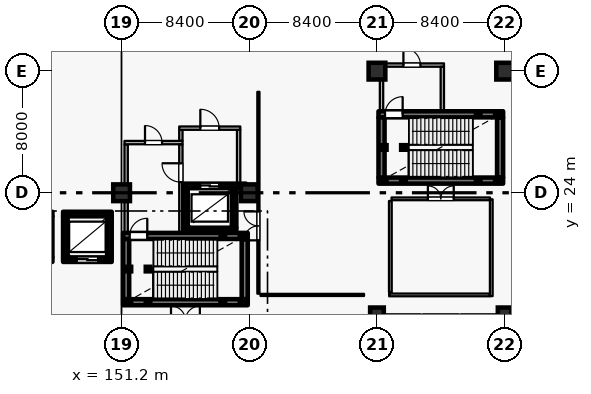
"""IFC4 building model, lengths in metres.
Left out: names, types, materials, properties, quantities, classifications, styles, units other than length and angle.
Written with IfcOpenShell. Run it as: python <this file> out.ifc"""

import sys

from ifc_helpers import new_model, si_unit, direction, frame, frame_2d, origin, origin_2d, place, context, subcontext, project, spatial, rectangle, hollow_rectangle, circle, extrude, element, fill, save


model = new_model("IFC4")
c1 = context("Model", 3, precision=1e-05, world=origin(), true_north=direction((0.0, 1.0)))
c2 = subcontext(c1, "Body", "Model", "MODEL_VIEW")
j1 = project(units=[si_unit("LENGTHUNIT", "METRE"), si_unit("PLANEANGLEUNIT", "RADIAN")], contexts=[c1])
p1 = place(None, origin())
s1 = spatial("IfcSite", under=j1, at=p1, CompositionType="ELEMENT")
p2 = place(p1, origin())
s2 = spatial("IfcBuilding", under=s1, at=p2, CompositionType="ELEMENT")
p3 = place(p2, origin())
s3 = spatial("IfcBuildingStorey", under=s2, at=p3, CompositionType="ELEMENT", Elevation=0.0)
for number, where, z_axis, x_axis in (
    (1, (151.2, 24.0, 0.0), (0.0, 0.0, 1.0), (1.0, 0.0, 0.0)),
    (2, (159.6, 24.0, 0.0), (0.0, 0.0, 1.0), (1.0, 0.0, 0.0)),
):
    element("IfcColumn", number, at=place(p3, frame(where, z_axis=z_axis, x_axis=x_axis)), inside=s3, PredefinedType="COLUMN", context=c2, shape_type="SweptSolid", body=[
        extrude(circle(Radius=0.55, at=origin_2d()), origin(), (0.0, 0.0, 1.0), 6.0),
    ])
p4 = place(p3, frame((168.0, 16.0, 0.0), z_axis=(0.0, 0.0, 1.0), x_axis=(1.0, 0.0, 0.0)))
e3 = element("IfcColumn", 3, at=p4, inside=s3, PredefinedType="COLUMN", context=c2, shape_type="SweptSolid", body=[
    extrude(circle(Radius=0.45, at=origin_2d()), origin(), (0.0, 0.0, 1.0), 6.0),
])
p5 = place(p3, frame((168.0, 32.0, 0.0), z_axis=(0.0, 0.0, 1.0), x_axis=(1.0, 0.0, 0.0)))
e4 = element("IfcColumn", 4, at=p5, inside=s3, PredefinedType="COLUMN", context=c2, shape_type="SweptSolid", body=[
    extrude(circle(Radius=0.55, at=origin_2d()), origin(), (0.0, 0.0, 1.0), 6.0),
])
p6 = place(p3, frame((176.4, 16.0, 0.0), z_axis=(0.0, 0.0, 1.0), x_axis=(1.0, 0.0, 0.0)))
e5 = element("IfcColumn", 5, at=p6, inside=s3, PredefinedType="COLUMN", context=c2, shape_type="SweptSolid", body=[
    extrude(circle(Radius=0.45, at=origin_2d()), origin(), (0.0, 0.0, 1.0), 6.0),
])
p7 = place(p3, frame((176.4, 32.0, 0.0), z_axis=(0.0, 0.0, 1.0), x_axis=(1.0, 0.0, 0.0)))
e6 = element("IfcColumn", 6, at=p7, inside=s3, PredefinedType="COLUMN", context=c2, shape_type="SweptSolid", body=[
    extrude(circle(Radius=0.55, at=origin_2d()), origin(), (0.0, 0.0, 1.0), 6.0),
])
p8 = place(p3, frame((155.25, 21.55, 0.0), z_axis=(0.0, 0.0, 1.0), x_axis=(1.0, 0.0, 0.0)))
e7 = element("IfcWall", 7, at=p8, inside=s3, PredefinedType="SHEAR", context=c2, shape_type="SweptSolid", body=[
    extrude(rectangle(XDim=3.5, YDim=0.3, at=frame_2d((1.75, 0.0))), origin(), (0.0, 0.0, 1.0), 5.675),
])
p9 = place(p3, frame((158.6, 21.705, 0.0), z_axis=(0.0, 0.0, 1.0), x_axis=(0.0, 1.0, 0.0)))
e8 = element("IfcWall", 8, at=p9, inside=s3, PredefinedType="SHEAR", context=c2, shape_type="SweptSolid", body=[
    extrude(rectangle(XDim=2.59, YDim=0.3, at=frame_2d((1.295, 0.0))), origin(), (0.0, 0.0, 1.0), 5.675),
])
p10 = place(p3, frame((159.38, 24.45, 0.0), z_axis=(0.0, 0.0, 1.0), x_axis=(-1.0, 0.0, 0.0)))
e9 = element("IfcWall", 9, at=p10, inside=s3, PredefinedType="SHEAR", context=c2, shape_type="SweptSolid", body=[
    extrude(rectangle(XDim=4.13, YDim=0.3, at=frame_2d((2.065, 0.0))), origin(), (0.0, 0.0, 1.0), 5.675),
])
p11 = place(p10, frame((1.755, 0.0, 0.0)))
e10 = element("IfcOpeningElement", 10, at=p11, cuts=e9, PredefinedType="OPENING", context=c2, shape_type="SweptSolid", body=[
    extrude(rectangle(XDim=1.25, YDim=2.25, at=frame_2d((0.625, 1.125))), frame((0.0, 0.16, 0.0), z_axis=(0.0, -1.0, 0.0), x_axis=(1.0, 0.0, 0.0)), (0.0, 0.0, 1.0), 0.32),
])
p12 = place(p3, frame((155.4, 24.295, 0.0), z_axis=(0.0, 0.0, 1.0), x_axis=(0.0, -1.0, 0.0)))
e11 = element("IfcWall", 11, at=p12, inside=s3, PredefinedType="SHEAR", context=c2, shape_type="SweptSolid", body=[
    extrude(rectangle(XDim=2.59, YDim=0.3, at=frame_2d((1.295, 0.0))), origin(), (0.0, 0.0, 1.0), 5.675),
])
p13 = place(p3, frame((147.35, 19.6, 0.0), z_axis=(0.0, 0.0, 1.0), x_axis=(1.0, 0.0, 0.0)))
e12 = element("IfcWall", 12, at=p13, inside=s3, PredefinedType="SHEAR", context=c2, shape_type="SweptSolid", body=[
    extrude(rectangle(XDim=3.2, YDim=0.3, at=frame_2d((1.6, 0.0))), origin(), (0.0, 0.0, 1.0), 5.675),
])
p14 = place(p13, frame((0.9, 0.0, 0.0)))
e13 = element("IfcOpeningElement", 13, at=p14, cuts=e12, PredefinedType="OPENING", context=c2, shape_type="SweptSolid", body=[
    extrude(rectangle(XDim=1.4, YDim=2.35, at=frame_2d((0.7, 1.175))), frame((0.0, 0.16, 0.0), z_axis=(0.0, -1.0, 0.0), x_axis=(1.0, 0.0, 0.0)), (0.0, 0.0, 1.0), 0.32),
])
p15 = place(p3, frame((150.4, 19.755, 0.0), z_axis=(0.0, 0.0, 1.0), x_axis=(0.0, 1.0, 0.0)))
e14 = element("IfcWall", 14, at=p15, inside=s3, PredefinedType="SHEAR", context=c2, shape_type="SweptSolid", body=[
    extrude(rectangle(XDim=2.69, YDim=0.3, at=frame_2d((1.345, 0.0))), origin(), (0.0, 0.0, 1.0), 5.675),
])
p16 = place(p3, frame((150.55, 22.6, 0.0), z_axis=(0.0, 0.0, 1.0), x_axis=(-1.0, 0.0, 0.0)))
e15 = element("IfcWall", 15, at=p16, inside=s3, PredefinedType="SHEAR", context=c2, shape_type="SweptSolid", body=[
    extrude(rectangle(XDim=3.2, YDim=0.3, at=frame_2d((1.6, 0.0))), origin(), (0.0, 0.0, 1.0), 5.675),
])
p17 = place(p3, frame((147.5, 22.445, 0.0), z_axis=(0.0, 0.0, 1.0), x_axis=(0.0, -1.0, 0.0)))
e16 = element("IfcWall", 16, at=p17, inside=s3, PredefinedType="SHEAR", context=c2, shape_type="SweptSolid", body=[
    extrude(rectangle(XDim=2.69, YDim=0.3, at=frame_2d((1.345, 0.0))), origin(), (0.0, 0.0, 1.0), 5.675),
])
p18 = place(p3, frame((151.3, 16.8, 0.0), z_axis=(0.0, 0.0, 1.0), x_axis=(1.0, 0.0, 0.0)))
e17 = element("IfcWall", 17, at=p18, inside=s3, PredefinedType="SHEAR", context=c2, shape_type="SweptSolid", body=[
    extrude(rectangle(XDim=8.2, YDim=0.4, at=frame_2d((4.1, 0.0))), origin(), (0.0, 0.0, 1.0), 5.675),
])
p19 = place(p3, frame((159.3, 17.005, 0.0), z_axis=(0.0, 0.0, 1.0), x_axis=(0.0, 1.0, 0.0)))
e18 = element("IfcWall", 18, at=p19, inside=s3, PredefinedType="SHEAR", context=c2, shape_type="SweptSolid", body=[
    extrude(rectangle(XDim=3.95, YDim=0.4, at=frame_2d((1.975, 0.0))), origin(), (0.0, 0.0, 1.0), 5.675),
])
p20 = place(p3, frame((151.3, 21.16, 0.0), z_axis=(0.0, 0.0, 1.0), x_axis=(1.0, 0.0, 0.0)))
e19 = element("IfcWall", 19, at=p20, inside=s3, PredefinedType="SHEAR", context=c2, shape_type="SweptSolid", body=[
    extrude(rectangle(XDim=8.2, YDim=0.4, at=frame_2d((4.1, 0.0))), origin(), (0.0, 0.0, 1.0), 5.675),
])
p21 = place(p20, frame((0.43, 0.0, 0.0)))
e20 = element("IfcOpeningElement", 20, at=p21, cuts=e19, PredefinedType="OPENING", context=c2, shape_type="SweptSolid", body=[
    extrude(rectangle(XDim=1.16, YDim=2.2, at=frame_2d((0.58, 1.1))), frame((0.0, 0.21, 0.0), z_axis=(0.0, -1.0, 0.0), x_axis=(1.0, 0.0, 0.0)), (0.0, 0.0, 1.0), 0.42),
])
p22 = place(p3, frame((151.5, 17.005, 0.0), z_axis=(0.0, 0.0, 1.0), x_axis=(0.0, 1.0, 0.0)))
e21 = element("IfcWall", 21, at=p22, inside=s3, PredefinedType="SHEAR", context=c2, shape_type="SweptSolid", body=[
    extrude(rectangle(XDim=3.95, YDim=0.4, at=frame_2d((1.975, 0.0))), origin(), (0.0, 0.0, 1.0), 5.675),
])
p23 = place(p3, frame((151.5, 21.365, 0.0), z_axis=(0.0, 0.0, 1.0), x_axis=(0.0, 1.0, 0.0)))
e22 = element("IfcWall", 22, at=p23, inside=s3, PredefinedType="PARTITIONING", context=c2, shape_type="SweptSolid", body=[
    extrude(rectangle(XDim=5.82, YDim=0.22, at=frame_2d((2.91, 0.0))), origin(), (0.0, 0.0, 1.0), 4.75),
])
p24 = place(p3, frame((151.39, 27.3, 0.0), z_axis=(0.0, 0.0, 1.0), x_axis=(1.0, 0.0, 0.0)))
e23 = element("IfcWall", 23, at=p24, inside=s3, PredefinedType="PARTITIONING", context=c2, shape_type="SweptSolid", body=[
    extrude(rectangle(XDim=3.82, YDim=0.22, at=frame_2d((1.91, 0.0))), origin(), (0.0, 0.0, 1.0), 5.675),
])
p25 = place(p24, frame((1.35, 0.0, 0.0)))
e24 = element("IfcOpeningElement", 24, at=p25, cuts=e23, PredefinedType="OPENING", context=c2, shape_type="SweptSolid", body=[
    extrude(rectangle(XDim=1.12, YDim=2.2, at=frame_2d((0.56, 1.1))), frame((0.0, 0.12, 0.0), z_axis=(0.0, -1.0, 0.0), x_axis=(1.0, 0.0, 0.0)), (0.0, 0.0, 1.0), 0.24),
])
p26 = place(p3, frame((155.1, 21.365, 0.0), z_axis=(0.0, 0.0, 1.0), x_axis=(0.0, 1.0, 0.0)))
e25 = element("IfcWall", 25, at=p26, inside=s3, PredefinedType="PARTITIONING", context=c2, shape_type="SweptSolid", body=[
    extrude(rectangle(XDim=5.82, YDim=0.22, at=frame_2d((2.91, 0.0))), origin(), (0.0, 0.0, 1.0), 5.675),
])
p27 = place(p26, frame((3.335, 0.0, 0.0)))
e26 = element("IfcOpeningElement", 26, at=p27, cuts=e25, PredefinedType="OPENING", context=c2, shape_type="SweptSolid", body=[
    extrude(rectangle(XDim=1.24, YDim=2.2, at=frame_2d((0.62, 1.1))), frame((0.0, 0.12, 0.0), z_axis=(0.0, -1.0, 0.0), x_axis=(1.0, 0.0, 0.0)), (0.0, 0.0, 1.0), 0.24),
])
p28 = place(p3, frame((155.1, 27.415, 0.0), z_axis=(0.0, 0.0, 1.0), x_axis=(0.0, 1.0, 0.0)))
e27 = element("IfcWall", 27, at=p28, inside=s3, PredefinedType="PARTITIONING", context=c2, shape_type="SweptSolid", body=[
    extrude(rectangle(XDim=0.72, YDim=0.22, at=frame_2d((0.36, 0.0))), origin(), (0.0, 0.0, 1.0), 5.675),
])
p29 = place(p3, frame((158.9, 24.605, 0.0), z_axis=(0.0, 0.0, 1.0), x_axis=(0.0, 1.0, 0.0)))
e28 = element("IfcWall", 28, at=p29, inside=s3, PredefinedType="PARTITIONING", context=c2, shape_type="SweptSolid", body=[
    extrude(rectangle(XDim=3.53, YDim=0.22, at=frame_2d((1.765, 0.0))), origin(), (0.0, 0.0, 1.0), 5.675),
])
p30 = place(p3, frame((154.99, 28.25, 0.0), z_axis=(0.0, 0.0, 1.0), x_axis=(1.0, 0.0, 0.0)))
e29 = element("IfcWall", 29, at=p30, inside=s3, PredefinedType="PARTITIONING", context=c2, shape_type="SweptSolid", body=[
    extrude(rectangle(XDim=4.02, YDim=0.22, at=frame_2d((2.01, 0.0))), origin(), (0.0, 0.0, 1.0), 5.675),
])
p31 = place(p30, frame((1.39, 0.0, 0.0)))
e30 = element("IfcOpeningElement", 30, at=p31, cuts=e29, PredefinedType="OPENING", context=c2, shape_type="SweptSolid", body=[
    extrude(rectangle(XDim=1.24, YDim=2.2, at=frame_2d((0.62, 1.1))), frame((0.0, 0.12, 0.0), z_axis=(0.0, -1.0, 0.0), x_axis=(1.0, 0.0, 0.0)), (0.0, 0.0, 1.0), 0.24),
])
for number, where, z_axis, x_axis in (
    (31, (151.68, 16.8, 0.0), (0.0, 0.0, 1.0), (1.0, 0.0, 0.0)),
    (32, (151.68, 18.98, 0.0), (0.0, 0.0, 1.0), (1.0, 0.0, 0.0)),
    (33, (152.94, 16.8, 0.0), (0.0, 0.0, 1.0), (1.0, 0.0, 0.0)),
    (34, (152.94, 18.98, 0.0), (0.0, 0.0, 1.0), (1.0, 0.0, 0.0)),
):
    element("IfcColumn", number, at=place(p3, frame(where, z_axis=z_axis, x_axis=x_axis)), inside=s3, PredefinedType="COLUMN", context=c2, shape_type="SweptSolid", body=[
        extrude(hollow_rectangle(XDim=0.3, YDim=0.3, WallThickness=0.012, at=origin_2d()), origin(), (0.0, 0.0, 1.0), 5.82),
    ])
for number, where, z_axis, x_axis in (
    (35, (157.86, 16.8, -2.7), (0.0, 0.0, 1.0), (1.0, 0.0, 0.0)),
    (36, (157.86, 21.16, -2.7), (0.0, 0.0, 1.0), (1.0, 0.0, 0.0)),
    (37, (159.12, 16.8, -2.7), (0.0, 0.0, 1.0), (1.0, 0.0, 0.0)),
    (38, (159.12, 21.16, -2.7), (0.0, 0.0, 1.0), (1.0, 0.0, 0.0)),
):
    element("IfcColumn", number, at=place(p3, frame(where, z_axis=z_axis, x_axis=x_axis)), inside=s3, PredefinedType="COLUMN", context=c2, shape_type="SweptSolid", body=[
        extrude(hollow_rectangle(XDim=0.3, YDim=0.3, WallThickness=0.012, at=origin_2d()), origin(), (0.0, 0.0, 1.0), 5.52),
    ])
p32 = place(p3, frame((168.1, 24.8, 0.0), z_axis=(0.0, 0.0, 1.0), x_axis=(1.0, 0.0, 0.0)))
e39 = element("IfcWall", 39, at=p32, inside=s3, PredefinedType="SHEAR", context=c2, shape_type="SweptSolid", body=[
    extrude(rectangle(XDim=8.2, YDim=0.4, at=frame_2d((4.1, 0.0))), origin(), (0.0, 0.0, 1.0), 5.675),
])
p33 = place(p3, frame((176.1, 25.005, 0.0), z_axis=(0.0, 0.0, 1.0), x_axis=(0.0, 1.0, 0.0)))
e40 = element("IfcWall", 40, at=p33, inside=s3, PredefinedType="SHEAR", context=c2, shape_type="SweptSolid", body=[
    extrude(rectangle(XDim=3.95, YDim=0.4, at=frame_2d((1.975, 0.0))), origin(), (0.0, 0.0, 1.0), 5.675),
])
p34 = place(p3, frame((168.1, 29.16, 0.0), z_axis=(0.0, 0.0, 1.0), x_axis=(1.0, 0.0, 0.0)))
e41 = element("IfcWall", 41, at=p34, inside=s3, PredefinedType="SHEAR", context=c2, shape_type="SweptSolid", body=[
    extrude(rectangle(XDim=8.2, YDim=0.4, at=frame_2d((4.1, 0.0))), origin(), (0.0, 0.0, 1.0), 5.675),
])
p35 = place(p34, frame((0.43, 0.0, 0.0)))
e42 = element("IfcOpeningElement", 42, at=p35, cuts=e41, PredefinedType="OPENING", context=c2, shape_type="SweptSolid", body=[
    extrude(rectangle(XDim=1.16, YDim=2.2, at=frame_2d((0.58, 1.1))), frame((0.0, 0.21, 0.0), z_axis=(0.0, -1.0, 0.0), x_axis=(1.0, 0.0, 0.0)), (0.0, 0.0, 1.0), 0.42),
])
p36 = place(p3, frame((168.3, 25.005, 0.0), z_axis=(0.0, 0.0, 1.0), x_axis=(0.0, 1.0, 0.0)))
e43 = element("IfcWall", 43, at=p36, inside=s3, PredefinedType="SHEAR", context=c2, shape_type="SweptSolid", body=[
    extrude(rectangle(XDim=3.95, YDim=0.4, at=frame_2d((1.975, 0.0))), origin(), (0.0, 0.0, 1.0), 5.675),
])
p37 = place(p3, frame((168.3, 29.365, 0.0), z_axis=(0.0, 0.0, 1.0), x_axis=(0.0, 1.0, 0.0)))
e44 = element("IfcWall", 44, at=p37, inside=s3, PredefinedType="PARTITIONING", context=c2, shape_type="SweptSolid", body=[
    extrude(rectangle(XDim=2.92, YDim=0.22, at=frame_2d((1.46, 0.0))), origin(), (0.0, 0.0, 1.0), 4.75),
])
p38 = place(p3, frame((168.19, 32.4, 0.0), z_axis=(0.0, 0.0, 1.0), x_axis=(1.0, 0.0, 0.0)))
e45 = element("IfcWall", 45, at=p38, inside=s3, PredefinedType="PARTITIONING", context=c2, shape_type="SweptSolid", body=[
    extrude(rectangle(XDim=4.22, YDim=0.22, at=frame_2d((2.11, 0.0))), origin(), (0.0, 0.0, 1.0), 5.675),
])
p39 = place(p38, frame((1.55, 0.0, 0.0)))
e46 = element("IfcOpeningElement", 46, at=p39, cuts=e45, PredefinedType="OPENING", context=c2, shape_type="SweptSolid", body=[
    extrude(rectangle(XDim=1.12, YDim=2.2, at=frame_2d((0.56, 1.1))), frame((0.0, 0.12, 0.0), z_axis=(0.0, -1.0, 0.0), x_axis=(1.0, 0.0, 0.0)), (0.0, 0.0, 1.0), 0.24),
])
p40 = place(p3, frame((172.3, 29.365, 0.0), z_axis=(0.0, 0.0, 1.0), x_axis=(0.0, 1.0, 0.0)))
e47 = element("IfcWall", 47, at=p40, inside=s3, PredefinedType="PARTITIONING", context=c2, shape_type="SweptSolid", body=[
    extrude(rectangle(XDim=2.92, YDim=0.22, at=frame_2d((1.46, 0.0))), origin(), (0.0, 0.0, 1.0), 5.675),
])
for number, where, z_axis, x_axis in (
    (48, (168.48, 24.8, 0.0), (0.0, 0.0, 1.0), (1.0, 0.0, 0.0)),
    (49, (168.48, 26.98, 0.0), (0.0, 0.0, 1.0), (1.0, 0.0, 0.0)),
    (50, (169.74, 24.8, 0.0), (0.0, 0.0, 1.0), (1.0, 0.0, 0.0)),
    (51, (169.74, 26.98, 0.0), (0.0, 0.0, 1.0), (1.0, 0.0, 0.0)),
):
    element("IfcColumn", number, at=place(p3, frame(where, z_axis=z_axis, x_axis=x_axis)), inside=s3, PredefinedType="COLUMN", context=c2, shape_type="SweptSolid", body=[
        extrude(hollow_rectangle(XDim=0.3, YDim=0.3, WallThickness=0.012, at=origin_2d()), origin(), (0.0, 0.0, 1.0), 5.82),
    ])
for number, where, z_axis, x_axis in (
    (52, (174.66, 24.8, -2.7), (0.0, 0.0, 1.0), (1.0, 0.0, 0.0)),
    (53, (174.66, 29.16, -2.7), (0.0, 0.0, 1.0), (1.0, 0.0, 0.0)),
    (54, (175.92, 24.8, -2.7), (0.0, 0.0, 1.0), (1.0, 0.0, 0.0)),
    (55, (175.92, 29.16, -2.7), (0.0, 0.0, 1.0), (1.0, 0.0, 0.0)),
):
    element("IfcColumn", number, at=place(p3, frame(where, z_axis=z_axis, x_axis=x_axis)), inside=s3, PredefinedType="COLUMN", context=c2, shape_type="SweptSolid", body=[
        extrude(hollow_rectangle(XDim=0.3, YDim=0.3, WallThickness=0.012, at=origin_2d()), origin(), (0.0, 0.0, 1.0), 5.52),
    ])
p41 = place(p3, frame((160.2, 17.36, 0.0), z_axis=(0.0, 0.0, 1.0), x_axis=(0.0, 1.0, 0.0)))
e56 = element("IfcWall", 56, at=p41, inside=s3, PredefinedType="PARTITIONING", context=c2, shape_type="SweptSolid", body=[
    extrude(rectangle(XDim=13.28, YDim=0.14, at=frame_2d((6.64, 0.0))), origin(), (0.0, 0.0, 1.0), 5.675),
])
p42 = place(p41, frame((3.51, 0.0, 0.0)))
e57 = element("IfcOpeningElement", 57, at=p42, cuts=e56, PredefinedType="OPENING", context=c2, shape_type="SweptSolid", body=[
    extrude(rectangle(XDim=1.9, YDim=2.4, at=frame_2d((0.95, 1.2))), frame((0.0, 0.08, 0.0), z_axis=(0.0, -1.0, 0.0), x_axis=(1.0, 0.0, 0.0)), (0.0, 0.0, 1.0), 0.16),
])
p43 = place(p3, frame((160.34, 17.28, 0.0), z_axis=(0.0, 0.0, 1.0), x_axis=(1.0, 0.0, 0.0)))
e58 = element("IfcWall", 58, at=p43, inside=s3, PredefinedType="PARTITIONING", context=c2, shape_type="SweptSolid", body=[
    extrude(rectangle(XDim=6.81, YDim=0.14, at=frame_2d((3.405, 0.0))), origin(), (0.0, 0.0, 1.0), 5.675),
])
p44 = place(p3, frame((168.96, 23.6, 0.0), z_axis=(0.0, 0.0, 1.0), x_axis=(1.0, 0.0, 0.0)))
e59 = element("IfcWall", 59, at=p44, inside=s3, PredefinedType="PARTITIONING", context=c2, shape_type="SweptSolid", body=[
    extrude(rectangle(XDim=6.48, YDim=0.18, at=frame_2d((3.24, 0.0))), origin(), (0.0, 0.0, 1.0), 5.675),
])
p45 = place(p44, frame((2.39, 0.0, 0.0)))
e60 = element("IfcOpeningElement", 60, at=p45, cuts=e59, PredefinedType="OPENING", context=c2, shape_type="SweptSolid", body=[
    extrude(rectangle(XDim=1.7, YDim=2.3, at=frame_2d((0.85, 1.15))), frame((0.0, 0.1, 0.0), z_axis=(0.0, -1.0, 0.0), x_axis=(1.0, 0.0, 0.0)), (0.0, 0.0, 1.0), 0.2),
])
p46 = place(p3, frame((168.88, 17.45, 0.0), z_axis=(0.0, 0.0, 1.0), x_axis=(0.0, 1.0, 0.0)))
e61 = element("IfcWall", 61, at=p46, inside=s3, PredefinedType="PARTITIONING", context=c2, shape_type="SweptSolid", body=[
    extrude(rectangle(XDim=6.01, YDim=0.18, at=frame_2d((3.005, 0.0))), origin(), (0.0, 0.0, 1.0), 5.675),
])
p47 = place(p3, frame((175.52, 17.2, 0.0), z_axis=(0.0, 0.0, 1.0), x_axis=(0.0, 1.0, 0.0)))
e62 = element("IfcWall", 62, at=p47, inside=s3, PredefinedType="PARTITIONING", context=c2, shape_type="SweptSolid", body=[
    extrude(rectangle(XDim=6.368, YDim=0.18, at=frame_2d((3.184, 0.0))), origin(), (0.0, 0.0, 1.0), 5.675),
])
p48 = place(p3, frame((168.8, 17.28, 0.0), z_axis=(0.0, 0.0, 1.0), x_axis=(1.0, 0.0, 0.0)))
e63 = element("IfcWall", 63, at=p48, inside=s3, PredefinedType="PARTITIONING", context=c2, shape_type="SweptSolid", body=[
    extrude(rectangle(XDim=6.63, YDim=0.18, at=frame_2d((3.315, 0.0))), origin(), (0.0, 0.0, 1.0), 5.675),
])
p49 = place(p11, origin())
e64 = element("IfcDoor", 64, at=p49, inside=s3, OperationType="DOUBLE_DOOR_SLIDING", PredefinedType="DOOR", context=c2, shape_type="SweptSolid", body=[
    extrude(rectangle(XDim=1.25, YDim=2.25, at=frame_2d((0.625, 1.125))), frame((0.0, 0.025, 0.0), z_axis=(0.0, -1.0, 0.0), x_axis=(1.0, 0.0, 0.0)), (0.0, 0.0, 1.0), 0.05),
])
fill(e10, e64)
p50 = place(p14, origin())
e65 = element("IfcDoor", 65, at=p50, inside=s3, OperationType="DOUBLE_DOOR_SLIDING", PredefinedType="DOOR", context=c2, shape_type="SweptSolid", body=[
    extrude(rectangle(XDim=1.4, YDim=2.35, at=frame_2d((0.7, 1.175))), frame((0.0, 0.025, 0.0), z_axis=(0.0, -1.0, 0.0), x_axis=(1.0, 0.0, 0.0)), (0.0, 0.0, 1.0), 0.05),
])
fill(e13, e65)
p51 = place(p21, origin())
e66 = element("IfcDoor", 66, at=p51, inside=s3, OperationType="SINGLE_SWING_RIGHT", PredefinedType="DOOR", context=c2, shape_type="SweptSolid", body=[
    extrude(rectangle(XDim=1.16, YDim=2.2, at=frame_2d((0.58, 1.1))), frame((0.0, 0.025, 0.0), z_axis=(0.0, -1.0, 0.0), x_axis=(1.0, 0.0, 0.0)), (0.0, 0.0, 1.0), 0.05),
])
fill(e20, e66)
p52 = place(p25, origin())
e67 = element("IfcDoor", 67, at=p52, inside=s3, OperationType="SINGLE_SWING_LEFT", PredefinedType="DOOR", context=c2, shape_type="SweptSolid", body=[
    extrude(rectangle(XDim=1.12, YDim=2.2, at=frame_2d((0.56, 1.1))), frame((0.0, 0.025, 0.0), z_axis=(0.0, -1.0, 0.0), x_axis=(1.0, 0.0, 0.0)), (0.0, 0.0, 1.0), 0.05),
])
fill(e24, e67)
p53 = place(p27, origin())
e68 = element("IfcDoor", 68, at=p53, inside=s3, OperationType="SINGLE_SWING_RIGHT", PredefinedType="DOOR", context=c2, shape_type="SweptSolid", body=[
    extrude(rectangle(XDim=1.24, YDim=2.2, at=frame_2d((0.62, 1.1))), frame((0.0, 0.025, 0.0), z_axis=(0.0, -1.0, 0.0), x_axis=(1.0, 0.0, 0.0)), (0.0, 0.0, 1.0), 0.05),
])
fill(e26, e68)
p54 = place(p31, origin())
e69 = element("IfcDoor", 69, at=p54, inside=s3, OperationType="SINGLE_SWING_LEFT", PredefinedType="DOOR", context=c2, shape_type="SweptSolid", body=[
    extrude(rectangle(XDim=1.24, YDim=2.2, at=frame_2d((0.62, 1.1))), frame((0.0, 0.025, 0.0), z_axis=(0.0, -1.0, 0.0), x_axis=(1.0, 0.0, 0.0)), (0.0, 0.0, 1.0), 0.05),
])
fill(e30, e69)
p55 = place(p35, origin())
e70 = element("IfcDoor", 70, at=p55, inside=s3, OperationType="SINGLE_SWING_RIGHT", PredefinedType="DOOR", context=c2, shape_type="SweptSolid", body=[
    extrude(rectangle(XDim=1.16, YDim=2.2, at=frame_2d((0.58, 1.1))), frame((0.0, 0.025, 0.0), z_axis=(0.0, -1.0, 0.0), x_axis=(1.0, 0.0, 0.0)), (0.0, 0.0, 1.0), 0.05),
])
fill(e42, e70)
p56 = place(p39, origin())
e71 = element("IfcDoor", 71, at=p56, inside=s3, OperationType="SINGLE_SWING_LEFT", PredefinedType="DOOR", context=c2, shape_type="SweptSolid", body=[
    extrude(rectangle(XDim=1.12, YDim=2.2, at=frame_2d((0.56, 1.1))), frame((0.0, 0.025, 0.0), z_axis=(0.0, -1.0, 0.0), x_axis=(1.0, 0.0, 0.0)), (0.0, 0.0, 1.0), 0.05),
])
fill(e46, e71)
p57 = place(p42, origin())
e72 = element("IfcDoor", 72, at=p57, inside=s3, OperationType="DOUBLE_DOOR_SINGLE_SWING", PredefinedType="DOOR", context=c2, shape_type="SweptSolid", body=[
    extrude(rectangle(XDim=1.9, YDim=2.4, at=frame_2d((0.95, 1.2))), frame((0.0, 0.025, 0.0), z_axis=(0.0, -1.0, 0.0), x_axis=(1.0, 0.0, 0.0)), (0.0, 0.0, 1.0), 0.05),
])
fill(e57, e72)
p58 = place(p45, origin())
e73 = element("IfcDoor", 73, at=p58, inside=s3, OperationType="DOUBLE_DOOR_SINGLE_SWING", PredefinedType="DOOR", context=c2, shape_type="SweptSolid", body=[
    extrude(rectangle(XDim=1.7, YDim=2.3, at=frame_2d((0.85, 1.15))), frame((0.0, 0.025, 0.0), z_axis=(0.0, -1.0, 0.0), x_axis=(1.0, 0.0, 0.0)), (0.0, 0.0, 1.0), 0.05),
])
fill(e60, e73)
save(model, sys.argv[1])
